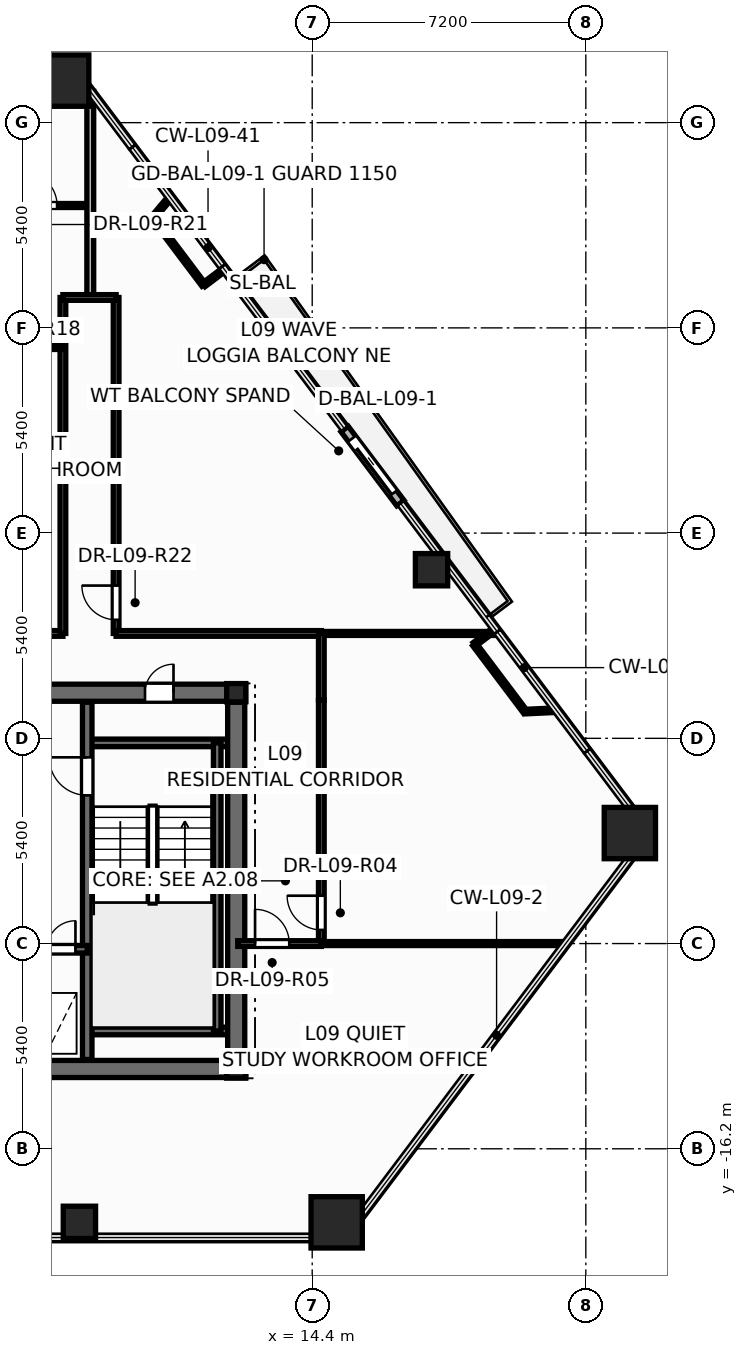
"""IFC4 building model, lengths in metres.
Left out: names, types, materials, properties, quantities, classifications, styles, units other than length and angle.
Written with IfcOpenShell. Run it as: python <this file> out.ifc"""

import sys

from ifc_helpers import new_model, si_unit, direction, frame, frame_2d, origin, origin_2d, place, context, subcontext, project, spatial, rectangle, hollow_rectangle, hollow_circle, i_section, extrude, element, fill, save


model = new_model("IFC4")
c1 = context("Model", 3, precision=1e-05, world=origin(), true_north=direction((0.0, 1.0)))
c2 = subcontext(c1, "Body", "Model", "MODEL_VIEW")
j1 = project(units=[si_unit("LENGTHUNIT", "METRE"), si_unit("PLANEANGLEUNIT", "RADIAN")], contexts=[c1])
p1 = place(None, origin())
s1 = spatial("IfcSite", under=j1, at=p1, CompositionType="ELEMENT")
p2 = place(p1, origin())
s2 = spatial("IfcBuilding", under=s1, at=p2, CompositionType="ELEMENT")
p3 = place(p2, frame((0.0, 0.0, 38.7)))
s3 = spatial("IfcBuildingStorey", under=s2, at=p3, CompositionType="ELEMENT", Elevation=38.7)
for number, where, z_axis, x_axis in (
    (1, (15.044, -18.135, 0.0), (0.0, 0.0, 1.0), (1.0, 0.0, 0.0)),
    (2, (22.759, -7.892, 0.0), (0.0, 0.0, 1.0), (1.0, 0.0, 0.0)),
    (3, (7.847, 11.906, 0.0), (0.0, 0.0, 1.0), (1.0, 0.0, 0.0)),
):
    element("IfcColumn", number, at=place(p3, frame(where, z_axis=z_axis, x_axis=x_axis)), inside=s3, PredefinedType="COLUMN", context=c2, shape_type="SweptSolid", body=[
        extrude(hollow_rectangle(XDim=1.35, YDim=1.35, WallThickness=0.065, at=origin_2d()), origin(), (0.0, 0.0, 1.0), 3.6),
    ])
for number, where, z_axis, x_axis in (
    (4, (8.274, -18.135, 0.0), (0.0, 0.0, 1.0), (1.0, 0.0, 0.0)),
    (5, (17.54, -0.963, 0.0), (0.0, 0.0, 1.0), (1.0, 0.0, 0.0)),
    (6, (13.066, 4.976, 0.0), (0.0, 0.0, 1.0), (1.0, 0.0, 0.0)),
):
    element("IfcColumn", number, at=place(p3, frame(where, z_axis=z_axis, x_axis=x_axis)), inside=s3, PredefinedType="COLUMN", context=c2, shape_type="SweptSolid", body=[
        extrude(hollow_circle(Radius=0.425, WallThickness=0.038, at=origin_2d()), origin(), (0.0, 0.0, 1.0), 3.6),
    ])
for number, where, z_axis, x_axis in (
    (7, (12.4, -14.1, 0.0), (0.0, 0.0, 1.0), (1.0, 0.0, 0.0)),
    (8, (12.4, -4.2, 0.0), (0.0, 0.0, 1.0), (1.0, 0.0, 0.0)),
):
    element("IfcColumn", number, at=place(p3, frame(where, z_axis=z_axis, x_axis=x_axis)), inside=s3, PredefinedType="COLUMN", context=c2, shape_type="SweptSolid", body=[
        extrude(i_section(OverallWidth=0.5, OverallDepth=0.482, WebThickness=0.04, FlangeThickness=0.045, at=origin_2d()), origin(), (0.0, 0.0, 1.0), 3.6),
    ])
p4 = place(p3, frame((16.72, 0.79, -0.015), z_axis=(0.0, 0.0, 1.0), x_axis=(-0.601647678338, 0.798761585926, 0.0)))
e9 = element("IfcWall", 9, at=p4, inside=s3, PredefinedType="STANDARD", context=c2, shape_type="SweptSolid", body=[
    extrude(rectangle(XDim=2.44, YDim=0.24, at=frame_2d((1.22, 0.0))), origin(), (0.0, 0.0, 1.0), 2.728),
])
p5 = place(p4, frame((0.32, 0.0, 0.015)))
e10 = element("IfcOpeningElement", 10, at=p5, cuts=e9, PredefinedType="OPENING", context=c2, shape_type="SweptSolid", body=[
    extrude(rectangle(XDim=1.806, YDim=2.204, at=frame_2d((0.9, 1.102))), frame((0.0, 0.13, 0.0), z_axis=(0.0, -1.0, 0.0), x_axis=(1.0, 0.0, 0.0)), (0.0, 0.0, 1.0), 0.26),
])
p6 = place(p3, frame((-12.65, -14.1, 0.0), z_axis=(0.0, 0.0, 1.0), x_axis=(1.0, 0.0, 0.0)))
e11 = element("IfcWall", 11, at=p6, inside=s3, PredefinedType="SHEAR", context=c2, shape_type="SweptSolid", body=[
    extrude(rectangle(XDim=25.3, YDim=0.45, at=frame_2d((12.65, 0.0))), origin(), (0.0, 0.0, 1.0), 3.6),
])
p7 = place(p3, frame((-12.65, -4.2, 0.0), z_axis=(0.0, 0.0, 1.0), x_axis=(1.0, 0.0, 0.0)))
e12 = element("IfcWall", 12, at=p7, inside=s3, PredefinedType="SHEAR", context=c2, shape_type="SweptSolid", body=[
    extrude(rectangle(XDim=25.3, YDim=0.45, at=frame_2d((12.65, 0.0))), origin(), (0.0, 0.0, 1.0), 3.6),
])
p8 = place(p7, frame((1.85, 0.0, 0.0)))
e13 = element("IfcOpeningElement", 13, at=p8, cuts=e12, PredefinedType="OPENING", context=c2, shape_type="SweptSolid", body=[
    extrude(rectangle(XDim=0.756, YDim=2.054, at=frame_2d((0.375, 1.027))), frame((0.0, 0.235, 0.0), z_axis=(0.0, -1.0, 0.0), x_axis=(1.0, 0.0, 0.0)), (0.0, 0.0, 1.0), 0.47),
])
p9 = place(p7, frame((22.65, 0.0, 0.0)))
e14 = element("IfcOpeningElement", 14, at=p9, cuts=e12, PredefinedType="OPENING", context=c2, shape_type="SweptSolid", body=[
    extrude(rectangle(XDim=0.756, YDim=2.054, at=frame_2d((0.375, 1.027))), frame((0.0, 0.235, 0.0), z_axis=(0.0, -1.0, 0.0), x_axis=(1.0, 0.0, 0.0)), (0.0, 0.0, 1.0), 0.47),
])
p10 = place(p7, frame((5.85, 0.0, 0.0)))
e15 = element("IfcOpeningElement", 15, at=p10, cuts=e12, PredefinedType="OPENING", context=c2, shape_type="SweptSolid", body=[
    extrude(rectangle(XDim=1.006, YDim=2.104, at=frame_2d((0.5, 1.052))), frame((0.0, 0.235, 0.0), z_axis=(0.0, -1.0, 0.0), x_axis=(1.0, 0.0, 0.0)), (0.0, 0.0, 1.0), 0.47),
])
p11 = place(p7, frame((10.35, 0.0, 0.0)))
e16 = element("IfcOpeningElement", 16, at=p11, cuts=e12, PredefinedType="OPENING", context=c2, shape_type="SweptSolid", body=[
    extrude(rectangle(XDim=1.406, YDim=2.154, at=frame_2d((0.7, 1.077))), frame((0.0, 0.235, 0.0), z_axis=(0.0, -1.0, 0.0), x_axis=(1.0, 0.0, 0.0)), (0.0, 0.0, 1.0), 0.47),
])
p12 = place(p7, frame((18.45, 0.0, 0.0)))
e17 = element("IfcOpeningElement", 17, at=p12, cuts=e12, PredefinedType="OPENING", context=c2, shape_type="SweptSolid", body=[
    extrude(rectangle(XDim=1.006, YDim=2.104, at=frame_2d((0.5, 1.052))), frame((0.0, 0.235, 0.0), z_axis=(0.0, -1.0, 0.0), x_axis=(1.0, 0.0, 0.0)), (0.0, 0.0, 1.0), 0.47),
])
for number, where, z_axis, x_axis in (
    (18, (8.48, -5.52, 0.0), (0.0, 0.0, 1.0), (1.0, 0.0, 0.0)),
    (19, (8.48, -13.1, 0.0), (0.0, 0.0, 1.0), (1.0, 0.0, 0.0)),
):
    element("IfcWall", number, at=place(p3, frame(where, z_axis=z_axis, x_axis=x_axis)), inside=s3, PredefinedType="SOLIDWALL", context=c2, shape_type="SweptSolid", body=[
        extrude(rectangle(XDim=3.87, YDim=0.2, at=frame_2d((1.935, 0.0))), origin(), (0.0, 0.0, 1.0), 3.6),
    ])
p13 = place(p3, frame((11.9, -13.1, 0.0), z_axis=(0.0, 0.0, 1.0), x_axis=(0.0, 1.0, 0.0)))
e20 = element("IfcWall", 20, at=p13, inside=s3, PredefinedType="SOLIDWALL", context=c2, shape_type="SweptSolid", body=[
    extrude(rectangle(XDim=7.58, YDim=0.2, at=frame_2d((3.79, 0.0))), origin(), (0.0, 0.0, 1.0), 3.6),
])
p14 = place(p3, frame((8.48, -13.85, 0.0), z_axis=(0.0, 0.0, 1.0), x_axis=(0.0, 1.0, 0.0)))
e21 = element("IfcWall", 21, at=p14, inside=s3, PredefinedType="SHEAR", context=c2, shape_type="SweptSolid", body=[
    extrude(rectangle(XDim=9.4, YDim=0.25, at=frame_2d((4.7, 0.0))), origin(), (0.0, 0.0, 1.0), 3.6),
])
p15 = place(p14, frame((6.95, 0.0, 0.0)))
e22 = element("IfcOpeningElement", 22, at=p15, cuts=e21, PredefinedType="OPENING", context=c2, shape_type="SweptSolid", body=[
    extrude(rectangle(XDim=1.006, YDim=2.104, at=frame_2d((0.5, 1.052))), frame((0.0, 0.135, 0.0), z_axis=(0.0, -1.0, 0.0), x_axis=(1.0, 0.0, 0.0)), (0.0, 0.0, 1.0), 0.27),
])
p16 = place(p3, frame((5.12, -10.95, 0.0), z_axis=(0.0, 0.0, 1.0), x_axis=(1.0, 0.0, 0.0)))
e23 = element("IfcWall", 23, at=p16, inside=s3, PredefinedType="SOLIDWALL", context=c2, shape_type="SweptSolid", body=[
    extrude(rectangle(XDim=3.36, YDim=0.2, at=frame_2d((1.68, 0.0))), origin(), (0.0, 0.0, 1.0), 3.6),
])
p17 = place(p16, frame((0.42, 0.0, 0.0)))
e24 = element("IfcOpeningElement", 24, at=p17, cuts=e23, PredefinedType="OPENING", context=c2, shape_type="SweptSolid", body=[
    extrude(rectangle(XDim=1.106, YDim=2.104, at=frame_2d((0.55, 1.052))), frame((0.0, 0.11, 0.0), z_axis=(0.0, -1.0, 0.0), x_axis=(1.0, 0.0, 0.0)), (0.0, 0.0, 1.0), 0.22),
])
p18 = place(p16, frame((2.3, 0.0, 0.0)))
e25 = element("IfcOpeningElement", 25, at=p18, cuts=e23, PredefinedType="OPENING", context=c2, shape_type="SweptSolid", body=[
    extrude(rectangle(XDim=0.756, YDim=2.054, at=frame_2d((0.375, 1.027))), frame((0.0, 0.11, 0.0), z_axis=(0.0, -1.0, 0.0), x_axis=(1.0, 0.0, 0.0)), (0.0, 0.0, 1.0), 0.22),
])
p19 = place(p3, frame((12.4, -13.85, 0.0), z_axis=(0.0, 0.0, 1.0), x_axis=(0.0, 1.0, 0.0)))
e26 = element("IfcWall", 26, at=p19, inside=s3, PredefinedType="SHEAR", context=c2, shape_type="SweptSolid", body=[
    extrude(rectangle(XDim=9.4, YDim=0.45, at=frame_2d((4.7, 0.0))), origin(), (0.0, 0.0, 1.0), 3.6),
])
p20 = place(p3, frame((9.24, -2.64, 0.0), z_axis=(0.0, 0.0, 1.0), x_axis=(0.0, 1.0, 0.0)))
e27 = element("IfcWall", 27, at=p20, inside=s3, PredefinedType="PARTITIONING", context=c2, shape_type="SweptSolid", body=[
    extrude(rectangle(XDim=8.84, YDim=0.15, at=frame_2d((4.42, 0.0))), origin(), (0.0, 0.0, 1.0), 2.509),
])
p21 = place(p20, frame((0.359, 0.0, 0.0)))
e28 = element("IfcOpeningElement", 28, at=p21, cuts=e27, PredefinedType="OPENING", context=c2, shape_type="SweptSolid", body=[
    extrude(rectangle(XDim=0.906, YDim=2.104, at=frame_2d((0.45, 1.052))), frame((0.0, 0.085, 0.0), z_axis=(0.0, -1.0, 0.0), x_axis=(1.0, 0.0, 0.0)), (0.0, 0.0, 1.0), 0.17),
])
p22 = place(p3, frame((14.64, -10.8, 0.0), z_axis=(0.0, 0.0, 1.0), x_axis=(1.0, 0.0, 0.0)))
e29 = element("IfcWall", 29, at=p22, inside=s3, PredefinedType="PARTITIONING", context=c2, shape_type="SweptSolid", body=[
    extrude(rectangle(XDim=6.43, YDim=0.105, at=frame_2d((3.215, 0.0))), origin(), (0.0, 0.0, 1.0), 2.713),
])
p23 = place(p3, frame((14.64, -10.8, 0.0), z_axis=(0.0, 0.0, 1.0), x_axis=(0.0, 1.0, 0.0)))
e30 = element("IfcWall", 30, at=p23, inside=s3, PredefinedType="PARTITIONING", context=c2, shape_type="SweptSolid", body=[
    extrude(rectangle(XDim=6.4, YDim=0.15, at=frame_2d((3.2, 0.0))), origin(), (0.0, 0.0, 1.0), 2.325),
])
p24 = place(p23, frame((0.359, 0.0, 0.0)))
e31 = element("IfcOpeningElement", 31, at=p24, cuts=e30, PredefinedType="OPENING", context=c2, shape_type="SweptSolid", body=[
    extrude(rectangle(XDim=0.906, YDim=2.104, at=frame_2d((0.45, 1.052))), frame((0.0, 0.085, 0.0), z_axis=(0.0, -1.0, 0.0), x_axis=(1.0, 0.0, 0.0)), (0.0, 0.0, 1.0), 0.17),
])
p25 = place(p3, frame((2.8, 8.62, 0.0), z_axis=(0.0, 0.0, 1.0), x_axis=(1.0, 0.0, 0.0)))
e32 = element("IfcWall", 32, at=p25, inside=s3, PredefinedType="PARTITIONING", context=c2, shape_type="SweptSolid", body=[
    extrude(rectangle(XDim=5.76, YDim=0.105, at=frame_2d((2.88, 0.0))), origin(), (0.0, 0.0, 1.0), 2.509),
])
p26 = place(p25, frame((4.007, 0.0, 0.0)))
e33 = element("IfcOpeningElement", 33, at=p26, cuts=e32, PredefinedType="OPENING", context=c2, shape_type="SweptSolid", body=[
    extrude(rectangle(XDim=0.886, YDim=2.104, at=frame_2d((0.44, 1.052))), frame((0.0, 0.062, 0.0), z_axis=(0.0, -1.0, 0.0), x_axis=(1.0, 0.0, 0.0)), (0.0, 0.0, 1.0), 0.125),
])
p27 = place(p3, frame((9.24, -2.64, 0.0), z_axis=(0.0, 0.0, 1.0), x_axis=(1.0, 0.0, 0.0)))
e34 = element("IfcWall", 34, at=p27, inside=s3, PredefinedType="PARTITIONING", context=c2, shape_type="SweptSolid", body=[
    extrude(rectangle(XDim=5.4, YDim=0.15, at=frame_2d((2.7, 0.0))), origin(), (0.0, 0.0, 1.0), 3.35),
])
p28 = place(p3, frame((2.74, -2.64, 0.0), z_axis=(0.0, 0.0, 1.0), x_axis=(1.0, 0.0, 0.0)))
e35 = element("IfcWall", 35, at=p28, inside=s3, PredefinedType="PARTITIONING", context=c2, shape_type="SweptSolid", body=[
    extrude(rectangle(XDim=5.1, YDim=0.15, at=frame_2d((2.55, 0.0))), origin(), (0.0, 0.0, 1.0), 2.325),
])
p29 = place(p28, frame((0.4, 0.0, 0.0)))
e36 = element("IfcOpeningElement", 36, at=p29, cuts=e35, PredefinedType="OPENING", context=c2, shape_type="SweptSolid", body=[
    extrude(rectangle(XDim=0.906, YDim=2.104, at=frame_2d((0.45, 1.052))), frame((0.0, 0.085, 0.0), z_axis=(0.0, -1.0, 0.0), x_axis=(1.0, 0.0, 0.0)), (0.0, 0.0, 1.0), 0.17),
])
p30 = place(p3, frame((7.84, -2.64, 0.0), z_axis=(0.0, 0.0, 1.0), x_axis=(0.0, 1.0, 0.0)))
e37 = element("IfcWall", 37, at=p30, inside=s3, PredefinedType="PARTITIONING", context=c2, shape_type="SweptSolid", body=[
    extrude(rectangle(XDim=8.84, YDim=0.15, at=frame_2d((4.42, 0.0))), origin(), (0.0, 0.0, 1.0), 2.509),
])
p31 = place(p3, frame((14.64, -2.64, 0.0), z_axis=(0.0, 0.0, 1.0), x_axis=(1.0, 0.0, 0.0)))
e38 = element("IfcWall", 38, at=p31, inside=s3, PredefinedType="PARTITIONING", context=c2, shape_type="SweptSolid", body=[
    extrude(rectangle(XDim=4.62, YDim=0.105, at=frame_2d((2.31, 0.0))), origin(), (0.0, 0.0, 1.0), 2.713),
])
p32 = place(p3, frame((8.56, 6.2, 0.0), z_axis=(0.0, 0.0, 1.0), x_axis=(0.0, 1.0, 0.0)))
e39 = element("IfcWall", 39, at=p32, inside=s3, PredefinedType="PARTITIONING", context=c2, shape_type="SweptSolid", body=[
    extrude(rectangle(XDim=5.425, YDim=0.18, at=frame_2d((2.712, 0.0))), origin(), (0.0, 0.0, 1.0), 2.509),
])
p33 = place(p3, frame((20.001, -4.697, 0.0), z_axis=(0.0, 0.0, 1.0), x_axis=(-0.601727904202, 0.798701151436, 0.0)))
e40 = element("IfcWall", 40, at=p33, inside=s3, PredefinedType="PARTITIONING", context=c2, shape_type="SweptSolid", body=[
    extrude(rectangle(XDim=2.214, YDim=0.12, at=frame_2d((1.107, 0.0))), origin(), (0.0, 0.0, 1.0), 3.35),
])
p34 = place(p3, frame((11.545, 6.531, 0.0), z_axis=(0.0, 0.0, 1.0), x_axis=(-0.60167490335, 0.798741078622, 0.0)))
e41 = element("IfcWall", 41, at=p34, inside=s3, PredefinedType="PARTITIONING", context=c2, shape_type="SweptSolid", body=[
    extrude(rectangle(XDim=2.214, YDim=0.12, at=frame_2d((1.107, 0.0))), origin(), (0.0, 0.0, 1.0), 3.35),
])
p35 = place(p3, frame((12.44, -10.8, 0.0), z_axis=(0.0, 0.0, 1.0), x_axis=(1.0, 0.0, 0.0)))
e42 = element("IfcWall", 42, at=p35, inside=s3, PredefinedType="PARTITIONING", context=c2, shape_type="SweptSolid", body=[
    extrude(rectangle(XDim=2.2, YDim=0.15, at=frame_2d((1.1, 0.0))), origin(), (0.0, 0.0, 1.0), 2.713),
])
p36 = place(p35, frame((0.456, 0.0, 0.0)))
e43 = element("IfcOpeningElement", 43, at=p36, cuts=e42, PredefinedType="OPENING", context=c2, shape_type="SweptSolid", body=[
    extrude(rectangle(XDim=0.906, YDim=2.104, at=frame_2d((0.45, 1.052))), frame((0.0, 0.085, 0.0), z_axis=(0.0, -1.0, 0.0), x_axis=(1.0, 0.0, 0.0)), (0.0, 0.0, 1.0), 0.17),
])
p37 = place(p3, frame((14.64, -4.4, 0.0), z_axis=(0.0, 0.0, 1.0), x_axis=(0.0, 1.0, 0.0)))
e44 = element("IfcWall", 44, at=p37, inside=s3, PredefinedType="PARTITIONING", context=c2, shape_type="SweptSolid", body=[
    extrude(rectangle(XDim=1.76, YDim=0.15, at=frame_2d((0.88, 0.0))), origin(), (0.0, 0.0, 1.0), 3.35),
])
p38 = place(p3, frame((6.362, 2.16, 0.0), z_axis=(0.0, 0.0, 1.0), x_axis=(1.0, 0.0, 0.0)))
e45 = element("IfcWall", 45, at=p38, inside=s3, PredefinedType="PARTITIONING", context=c2, shape_type="SweptSolid", body=[
    extrude(rectangle(XDim=1.478, YDim=0.135, at=frame_2d((0.739, 0.0))), origin(), (0.0, 0.0, 1.0), 2.325),
])
p39 = place(p3, frame((6.3, 4.9, 0.0), z_axis=(0.0, 0.0, 1.0), x_axis=(1.0, 0.0, 0.0)))
e46 = element("IfcWall", 46, at=p39, inside=s3, PredefinedType="PARTITIONING", context=c2, shape_type="SweptSolid", body=[
    extrude(rectangle(XDim=1.54, YDim=0.135, at=frame_2d((0.77, 0.0))), origin(), (0.0, 0.0, 1.0), 2.509),
])
p40 = place(p3, frame((20.812, -4.659, 0.0), z_axis=(0.0, 0.0, 1.0), x_axis=(-0.99892592368, -0.046335720556, 0.0)))
e47 = element("IfcWall", 47, at=p40, inside=s3, PredefinedType="PARTITIONING", context=c2, shape_type="SweptSolid", body=[
    extrude(rectangle(XDim=0.812, YDim=0.12, at=frame_2d((0.406, 0.0))), origin(), (0.0, 0.0, 1.0), 2.713),
])
p41 = place(p3, frame((7.84, 6.2, 0.0), z_axis=(0.0, 0.0, 1.0), x_axis=(1.0, 0.0, 0.0)))
e48 = element("IfcWall", 48, at=p41, inside=s3, PredefinedType="PARTITIONING", context=c2, shape_type="SweptSolid", body=[
    extrude(rectangle(XDim=1.4, YDim=0.15, at=frame_2d((0.7, 0.0))), origin(), (0.0, 0.0, 1.0), 3.35),
])
p42 = place(p3, frame((10.213, 8.3, 0.0), z_axis=(0.0, 0.0, 1.0), x_axis=(0.643391917875, 0.765536961886, 0.0)))
e49 = element("IfcWall", 49, at=p42, inside=s3, PredefinedType="PARTITIONING", context=c2, shape_type="SweptSolid", body=[
    extrude(rectangle(XDim=0.688, YDim=0.12, at=frame_2d((0.344, 0.0))), origin(), (0.0, 0.0, 1.0), 2.713),
])
p43 = place(p3, frame((18.669, -2.928, 0.0), z_axis=(0.0, 0.0, 1.0), x_axis=(0.798598820081, 0.601863709294, 0.0)))
e50 = element("IfcWall", 50, at=p43, inside=s3, PredefinedType="PARTITIONING", context=c2, shape_type="SweptSolid", body=[
    extrude(rectangle(XDim=0.67, YDim=0.12, at=frame_2d((0.335, 0.0))), origin(), (0.0, 0.0, 1.0), 2.713),
])
p44 = place(p3, frame((12.08, 6.935, 0.0), z_axis=(0.0, 0.0, 1.0), x_axis=(-0.798773936271, -0.601631281379, 0.0)))
e51 = element("IfcWall", 51, at=p44, inside=s3, PredefinedType="PARTITIONING", context=c2, shape_type="SweptSolid", body=[
    extrude(rectangle(XDim=0.67, YDim=0.12, at=frame_2d((0.335, 0.0))), origin(), (0.0, 0.0, 1.0), 2.713),
])
p45 = place(p5, origin())
e52 = element("IfcDoor", 52, at=p45, inside=s3, OperationType="SLIDING_TO_LEFT", PredefinedType="DOOR", context=c2, shape_type="SweptSolid", body=[
    extrude(rectangle(XDim=1.8, YDim=2.2, at=frame_2d((0.9, 1.1))), frame((0.0, 0.025, 0.0), z_axis=(0.0, -1.0, 0.0), x_axis=(1.0, 0.0, 0.0)), (0.0, 0.0, 1.0), 0.05),
])
fill(e10, e52)
p46 = place(p15, origin())
e53 = element("IfcDoor", 53, at=p46, inside=s3, OperationType="SINGLE_SWING_RIGHT", PredefinedType="DOOR", context=c2, shape_type="SweptSolid", body=[
    extrude(rectangle(XDim=1.0, YDim=2.1, at=frame_2d((0.5, 1.05))), frame((0.0, 0.025, 0.0), z_axis=(0.0, -1.0, 0.0), x_axis=(1.0, 0.0, 0.0)), (0.0, 0.0, 1.0), 0.05),
])
fill(e22, e53)
p47 = place(p18, origin())
e54 = element("IfcDoor", 54, at=p47, inside=s3, OperationType="SINGLE_SWING_RIGHT", PredefinedType="DOOR", context=c2, shape_type="SweptSolid", body=[
    extrude(rectangle(XDim=0.75, YDim=2.05, at=frame_2d((0.375, 1.025))), frame((0.0, 0.025, 0.0), z_axis=(0.0, -1.0, 0.0), x_axis=(1.0, 0.0, 0.0)), (0.0, 0.0, 1.0), 0.05),
])
fill(e25, e54)
p48 = place(p9, origin())
e55 = element("IfcDoor", 55, at=p48, inside=s3, OperationType="SINGLE_SWING_RIGHT", PredefinedType="DOOR", context=c2, shape_type="SweptSolid", body=[
    extrude(rectangle(XDim=0.75, YDim=2.05, at=frame_2d((0.375, 1.025))), frame((0.0, 0.025, 0.0), z_axis=(0.0, -1.0, 0.0), x_axis=(1.0, 0.0, 0.0)), (0.0, 0.0, 1.0), 0.05),
])
fill(e14, e55)
p49 = place(p24, origin())
e56 = element("IfcDoor", 56, at=p49, inside=s3, OperationType="SINGLE_SWING_RIGHT", PredefinedType="DOOR", context=c2, shape_type="SweptSolid", body=[
    extrude(rectangle(XDim=0.9, YDim=2.1, at=frame_2d((0.45, 1.05))), frame((0.0, 0.025, 0.0), z_axis=(0.0, -1.0, 0.0), x_axis=(1.0, 0.0, 0.0)), (0.0, 0.0, 1.0), 0.05),
])
fill(e31, e56)
p50 = place(p36, origin())
e57 = element("IfcDoor", 57, at=p50, inside=s3, OperationType="SINGLE_SWING_LEFT", PredefinedType="DOOR", context=c2, shape_type="SweptSolid", body=[
    extrude(rectangle(XDim=0.9, YDim=2.1, at=frame_2d((0.45, 1.05))), frame((0.0, 0.025, 0.0), z_axis=(0.0, -1.0, 0.0), x_axis=(1.0, 0.0, 0.0)), (0.0, 0.0, 1.0), 0.05),
])
fill(e43, e57)
p51 = place(p26, origin())
e58 = element("IfcDoor", 58, at=p51, inside=s3, OperationType="SINGLE_SWING_LEFT", PredefinedType="DOOR", context=c2, shape_type="SweptSolid", body=[
    extrude(rectangle(XDim=0.88, YDim=2.1, at=frame_2d((0.44, 1.05))), frame((0.0, 0.025, 0.0), z_axis=(0.0, -1.0, 0.0), x_axis=(1.0, 0.0, 0.0)), (0.0, 0.0, 1.0), 0.05),
])
fill(e33, e58)
p52 = place(p21, origin())
e59 = element("IfcDoor", 59, at=p52, inside=s3, OperationType="SINGLE_SWING_RIGHT", PredefinedType="DOOR", context=c2, shape_type="SweptSolid", body=[
    extrude(rectangle(XDim=0.9, YDim=2.1, at=frame_2d((0.45, 1.05))), frame((0.0, 0.025, 0.0), z_axis=(0.0, -1.0, 0.0), x_axis=(1.0, 0.0, 0.0)), (0.0, 0.0, 1.0), 0.05),
])
fill(e28, e59)
save(model, sys.argv[1])
